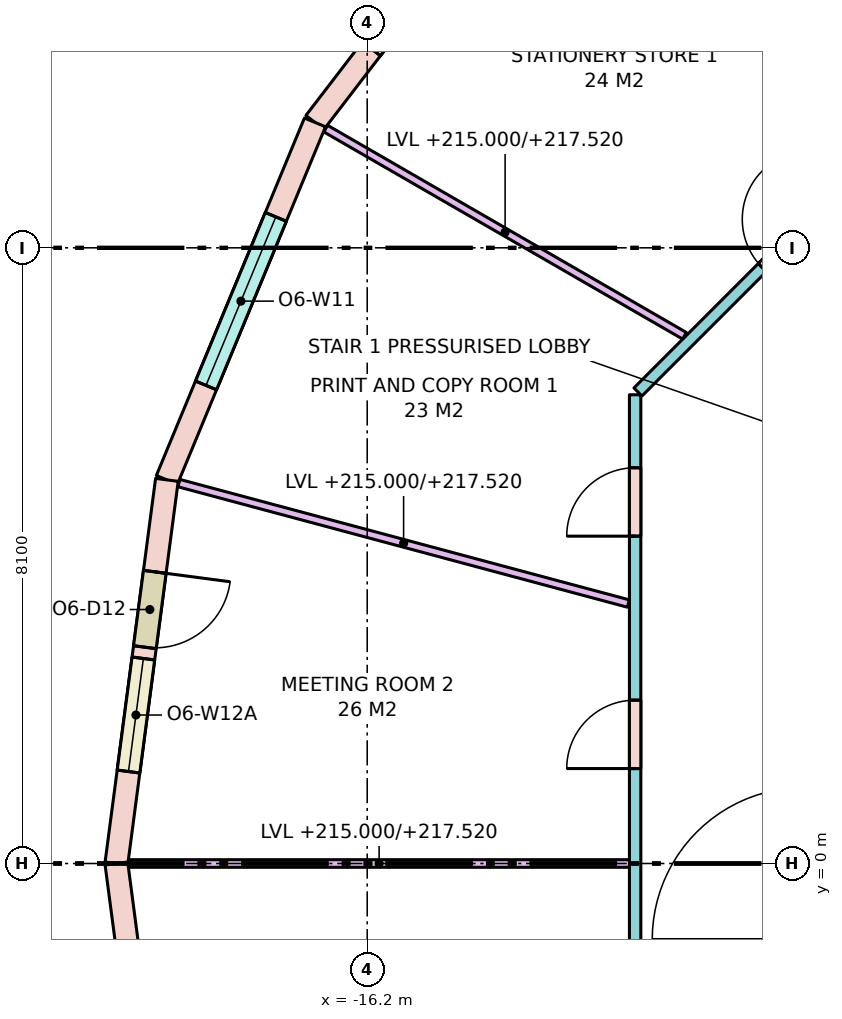
"""IFC4 building model, lengths in metres.
Left out: names, types, materials, properties, quantities, classifications, styles, units other than length and angle.
Written with IfcOpenShell. Run it as: python <this file> out.ifc"""

import sys

from ifc_helpers import new_model, si_unit, direction, frame, frame_2d, origin, place, context, subcontext, project, spatial, rectangle, extrude, element, fill, save


model = new_model("IFC4")
c1 = context("Model", 3, precision=1e-05, world=origin(), true_north=direction((0.0, 1.0)))
c2 = subcontext(c1, "Body", "Model", "MODEL_VIEW")
j1 = project(units=[si_unit("LENGTHUNIT", "METRE"), si_unit("PLANEANGLEUNIT", "RADIAN")], contexts=[c1])
p1 = place(None, origin())
s1 = spatial("IfcSite", under=j1, at=p1, CompositionType="ELEMENT")
p2 = place(p1, origin())
s2 = spatial("IfcBuilding", under=s1, at=p2, CompositionType="ELEMENT")
p3 = place(p2, frame((0.0, 0.0, 215.0)))
s3 = spatial("IfcBuildingStorey", under=s2, at=p3, CompositionType="ELEMENT", Elevation=215.0)
p4 = place(p3, frame((-13.789, 13.789, 0.0), z_axis=(0.0, 0.0, 1.0), x_axis=(-0.608757714995, -0.79335619014, 0.0)))
e1 = element("IfcWall", 1, at=p4, inside=s3, PredefinedType="STANDARD", context=c2, shape_type="SweptSolid", body=[
    extrude(rectangle(XDim=5.091, YDim=0.3, at=frame_2d((2.545, 0.0))), origin(), (0.0, 0.0, 1.0), 3.42),
])
p5 = place(p4, frame((1.22, 0.0, 0.0)))
e2 = element("IfcOpeningElement", 2, at=p5, cuts=e1, PredefinedType="OPENING", context=c2, shape_type="SweptSolid", body=[
    extrude(rectangle(XDim=1.0, YDim=2.4, at=frame_2d((0.5, 1.2))), frame((0.0, 0.16, 0.0), z_axis=(0.0, -1.0, 0.0), x_axis=(1.0, 0.0, 0.0)), (0.0, 0.0, 1.0), 0.32),
])
p6 = place(p4, frame((2.37, 0.0, 0.8)))
e3 = element("IfcOpeningElement", 3, at=p6, cuts=e1, PredefinedType="OPENING", context=c2, shape_type="SweptSolid", body=[
    extrude(rectangle(XDim=1.5, YDim=2.4, at=frame_2d((0.75, 1.2))), frame((0.0, 0.16, 0.0), z_axis=(0.0, -1.0, 0.0), x_axis=(1.0, 0.0, 0.0)), (0.0, 0.0, 1.0), 0.32),
])
p7 = place(p3, frame((-16.887, 9.75, 0.0), z_axis=(0.0, 0.0, 1.0), x_axis=(-0.382724538613, -0.923862504675, 0.0)))
e4 = element("IfcWall", 4, at=p7, inside=s3, PredefinedType="STANDARD", context=c2, shape_type="SweptSolid", body=[
    extrude(rectangle(XDim=5.091, YDim=0.3, at=frame_2d((2.545, 0.0))), origin(), (0.0, 0.0, 1.0), 3.42),
])
p8 = place(p7, frame((1.345, 0.0, 0.8)))
e5 = element("IfcOpeningElement", 5, at=p8, cuts=e4, PredefinedType="OPENING", context=c2, shape_type="SweptSolid", body=[
    extrude(rectangle(XDim=2.4, YDim=2.4, at=frame_2d((1.2, 1.2))), frame((0.0, 0.16, 0.0), z_axis=(0.0, -1.0, 0.0), x_axis=(1.0, 0.0, 0.0)), (0.0, 0.0, 1.0), 0.32),
])
p9 = place(p3, frame((-18.836, 5.047, 0.0), z_axis=(0.0, 0.0, 1.0), x_axis=(-0.130495451964, -0.99144890792, 0.0)))
e6 = element("IfcWall", 6, at=p9, inside=s3, PredefinedType="STANDARD", context=c2, shape_type="SweptSolid", body=[
    extrude(rectangle(XDim=5.091, YDim=0.3, at=frame_2d((2.545, 0.0))), origin(), (0.0, 0.0, 1.0), 3.42),
])
p10 = place(p9, frame((1.22, 0.0, 0.0)))
e7 = element("IfcOpeningElement", 7, at=p10, cuts=e6, PredefinedType="OPENING", context=c2, shape_type="SweptSolid", body=[
    extrude(rectangle(XDim=1.0, YDim=2.4, at=frame_2d((0.5, 1.2))), frame((0.0, 0.16, 0.0), z_axis=(0.0, -1.0, 0.0), x_axis=(1.0, 0.0, 0.0)), (0.0, 0.0, 1.0), 0.32),
])
p11 = place(p9, frame((2.37, 0.0, 0.8)))
e8 = element("IfcOpeningElement", 8, at=p11, cuts=e6, PredefinedType="OPENING", context=c2, shape_type="SweptSolid", body=[
    extrude(rectangle(XDim=1.5, YDim=2.4, at=frame_2d((0.75, 1.2))), frame((0.0, 0.16, 0.0), z_axis=(0.0, -1.0, 0.0), x_axis=(1.0, 0.0, 0.0)), (0.0, 0.0, 1.0), 0.32),
])
p12 = place(p3, frame((-19.5, 0.0, 0.0), z_axis=(0.0, 0.0, 1.0), x_axis=(0.130495451964, -0.99144890792, 0.0)))
e9 = element("IfcWall", 9, at=p12, inside=s3, PredefinedType="STANDARD", context=c2, shape_type="SweptSolid", body=[
    extrude(rectangle(XDim=5.091, YDim=0.3, at=frame_2d((2.545, 0.0))), origin(), (0.0, 0.0, 1.0), 3.42),
])
p13 = place(p12, frame((1.345, 0.0, 0.8)))
e10 = element("IfcOpeningElement", 10, at=p13, cuts=e9, PredefinedType="OPENING", context=c2, shape_type="SweptSolid", body=[
    extrude(rectangle(XDim=2.4, YDim=2.4, at=frame_2d((1.2, 1.2))), frame((0.0, 0.16, 0.0), z_axis=(0.0, -1.0, 0.0), x_axis=(1.0, 0.0, 0.0)), (0.0, 0.0, 1.0), 0.32),
])
p14 = place(p3, frame((-12.675, -6.167, 0.0), z_axis=(0.0, 0.0, 1.0), x_axis=(0.0, 1.0, 0.0)))
e11 = element("IfcWall", 11, at=p14, inside=s3, PredefinedType="PARTITIONING", context=c2, shape_type="SweptSolid", body=[
    extrude(rectangle(XDim=12.333, YDim=0.15, at=frame_2d((6.167, 0.0))), origin(), (0.0, 0.0, 1.0), 2.52),
])
p15 = place(p14, frame((10.473, 0.0, 0.0)))
e12 = element("IfcOpeningElement", 12, at=p15, cuts=e11, PredefinedType="OPENING", context=c2, shape_type="SweptSolid", body=[
    extrude(rectangle(XDim=0.9, YDim=2.1, at=frame_2d((0.45, 1.05))), frame((0.0, 0.085, 0.0), z_axis=(0.0, -1.0, 0.0), x_axis=(1.0, 0.0, 0.0)), (0.0, 0.0, 1.0), 0.17),
])
p16 = place(p14, frame((7.416, 0.0, 0.0)))
e13 = element("IfcOpeningElement", 13, at=p16, cuts=e11, PredefinedType="OPENING", context=c2, shape_type="SweptSolid", body=[
    extrude(rectangle(XDim=0.9, YDim=2.1, at=frame_2d((0.45, 1.05))), frame((0.0, 0.085, 0.0), z_axis=(0.0, -1.0, 0.0), x_axis=(1.0, 0.0, 0.0)), (0.0, 0.0, 1.0), 0.17),
])
p17 = place(p14, frame((4.018, 0.0, 0.0)))
e14 = element("IfcOpeningElement", 14, at=p17, cuts=e11, PredefinedType="OPENING", context=c2, shape_type="SweptSolid", body=[
    extrude(rectangle(XDim=0.9, YDim=2.1, at=frame_2d((0.45, 1.05))), frame((0.0, 0.085, 0.0), z_axis=(0.0, -1.0, 0.0), x_axis=(1.0, 0.0, 0.0)), (0.0, 0.0, 1.0), 0.17),
])
p18 = place(p14, frame((0.46, 0.0, 0.0)))
e15 = element("IfcOpeningElement", 15, at=p18, cuts=e11, PredefinedType="OPENING", context=c2, shape_type="SweptSolid", body=[
    extrude(rectangle(XDim=1.8, YDim=2.1, at=frame_2d((0.9, 1.05))), frame((0.0, 0.085, 0.0), z_axis=(0.0, -1.0, 0.0), x_axis=(1.0, 0.0, 0.0)), (0.0, 0.0, 1.0), 0.17),
])
p19 = place(p3, frame((-12.638, 6.204, 0.0), z_axis=(0.0, 0.0, 1.0), x_axis=(0.707106781187, 0.707106781187, 0.0)))
e16 = element("IfcWall", 16, at=p19, inside=s3, PredefinedType="PARTITIONING", context=c2, shape_type="SweptSolid", body=[
    extrude(rectangle(XDim=6.271, YDim=0.15, at=frame_2d((3.135, 0.0))), origin(), (0.0, 0.0, 1.0), 2.52),
])
p20 = place(p19, frame((4.935, 0.0, 0.0)))
e17 = element("IfcOpeningElement", 17, at=p20, cuts=e16, PredefinedType="OPENING", context=c2, shape_type="SweptSolid", body=[
    extrude(rectangle(XDim=0.9, YDim=2.1, at=frame_2d((0.45, 1.05))), frame((0.0, 0.085, 0.0), z_axis=(0.0, -1.0, 0.0), x_axis=(1.0, 0.0, 0.0)), (0.0, 0.0, 1.0), 0.17),
])
p21 = place(p19, frame((2.314, 0.0, 0.0)))
e18 = element("IfcOpeningElement", 18, at=p21, cuts=e16, PredefinedType="OPENING", context=c2, shape_type="SweptSolid", body=[
    extrude(rectangle(XDim=0.9, YDim=2.1, at=frame_2d((0.45, 1.05))), frame((0.0, 0.085, 0.0), z_axis=(0.0, -1.0, 0.0), x_axis=(1.0, 0.0, 0.0)), (0.0, 0.0, 1.0), 0.17),
])
p22 = place(p3, frame((-9.474, 9.474, 0.0), z_axis=(0.0, 0.0, 1.0), x_axis=(-0.707106781187, 0.707106781187, 0.0)))
e19 = element("IfcWall", 19, at=p22, inside=s3, PredefinedType="PARTITIONING", context=c2, shape_type="SweptSolid", body=[
    extrude(rectangle(XDim=5.938, YDim=0.1, at=frame_2d((2.969, 0.0))), origin(), (0.0, 0.0, 1.0), 2.52),
])
p23 = place(p3, frame((-12.025, 6.943, 0.0), z_axis=(0.0, 0.0, 1.0), x_axis=(-0.866029712004, 0.499992537871, 0.0)))
e20 = element("IfcWall", 20, at=p23, inside=s3, PredefinedType="PARTITIONING", context=c2, shape_type="SweptSolid", body=[
    extrude(rectangle(XDim=5.451, YDim=0.1, at=frame_2d((2.726, 0.0))), origin(), (0.0, 0.0, 1.0), 2.52),
])
p24 = place(p3, frame((-12.764, 3.42, 0.0), z_axis=(0.0, 0.0, 1.0), x_axis=(-0.965925800266, 0.258819142221, 0.0)))
e21 = element("IfcWall", 21, at=p24, inside=s3, PredefinedType="PARTITIONING", context=c2, shape_type="SweptSolid", body=[
    extrude(rectangle(XDim=6.122, YDim=0.1, at=frame_2d((3.061, 0.0))), origin(), (0.0, 0.0, 1.0), 2.52),
])
p25 = place(p3, frame((-12.75, 0.0, 0.0), z_axis=(0.0, 0.0, 1.0), x_axis=(-1.0, 0.0, 0.0)))
e22 = element("IfcWall", 22, at=p25, inside=s3, PredefinedType="PARTITIONING", context=c2, shape_type="SweptSolid", body=[
    extrude(rectangle(XDim=6.587, YDim=0.1, at=frame_2d((3.293, 0.0))), origin(), (0.0, 0.0, 1.0), 2.52),
])
p26 = place(p8, origin())
e23 = element("IfcWindow", 23, at=p26, inside=s3, PartitioningType="SINGLE_PANEL", PredefinedType="WINDOW", context=c2, shape_type="SweptSolid", body=[
    extrude(rectangle(XDim=2.4, YDim=2.4, at=frame_2d((1.2, 1.2))), frame((0.0, 0.03, 0.0), z_axis=(0.0, -1.0, 0.0), x_axis=(1.0, 0.0, 0.0)), (0.0, 0.0, 1.0), 0.06),
])
fill(e5, e23)
p27 = place(p10, origin())
e24 = element("IfcDoor", 24, at=p27, inside=s3, OperationType="SINGLE_SWING_LEFT", PredefinedType="DOOR", context=c2, shape_type="SweptSolid", body=[
    extrude(rectangle(XDim=1.0, YDim=2.4, at=frame_2d((0.5, 1.2))), frame((0.0, 0.025, 0.0), z_axis=(0.0, -1.0, 0.0), x_axis=(1.0, 0.0, 0.0)), (0.0, 0.0, 1.0), 0.05),
])
fill(e7, e24)
p28 = place(p11, origin())
e25 = element("IfcWindow", 25, at=p28, inside=s3, PartitioningType="SINGLE_PANEL", PredefinedType="WINDOW", context=c2, shape_type="SweptSolid", body=[
    extrude(rectangle(XDim=1.5, YDim=2.4, at=frame_2d((0.75, 1.2))), frame((0.0, 0.03, 0.0), z_axis=(0.0, -1.0, 0.0), x_axis=(1.0, 0.0, 0.0)), (0.0, 0.0, 1.0), 0.06),
])
fill(e8, e25)
p29 = place(p21, origin())
e26 = element("IfcDoor", 26, at=p29, inside=s3, OperationType="SINGLE_SWING_RIGHT", PredefinedType="DOOR", context=c2, shape_type="SweptSolid", body=[
    extrude(rectangle(XDim=0.9, YDim=2.1, at=frame_2d((0.45, 1.05))), frame((0.0, 0.025, 0.0), z_axis=(0.0, -1.0, 0.0), x_axis=(1.0, 0.0, 0.0)), (0.0, 0.0, 1.0), 0.05),
])
fill(e18, e26)
p30 = place(p15, origin())
e27 = element("IfcDoor", 27, at=p30, inside=s3, OperationType="SINGLE_SWING_LEFT", PredefinedType="DOOR", context=c2, shape_type="SweptSolid", body=[
    extrude(rectangle(XDim=0.9, YDim=2.1, at=frame_2d((0.45, 1.05))), frame((0.0, 0.025, 0.0), z_axis=(0.0, -1.0, 0.0), x_axis=(1.0, 0.0, 0.0)), (0.0, 0.0, 1.0), 0.05),
])
fill(e12, e27)
p31 = place(p16, origin())
e28 = element("IfcDoor", 28, at=p31, inside=s3, OperationType="SINGLE_SWING_LEFT", PredefinedType="DOOR", context=c2, shape_type="SweptSolid", body=[
    extrude(rectangle(XDim=0.9, YDim=2.1, at=frame_2d((0.45, 1.05))), frame((0.0, 0.025, 0.0), z_axis=(0.0, -1.0, 0.0), x_axis=(1.0, 0.0, 0.0)), (0.0, 0.0, 1.0), 0.05),
])
fill(e13, e28)
save(model, sys.argv[1])
